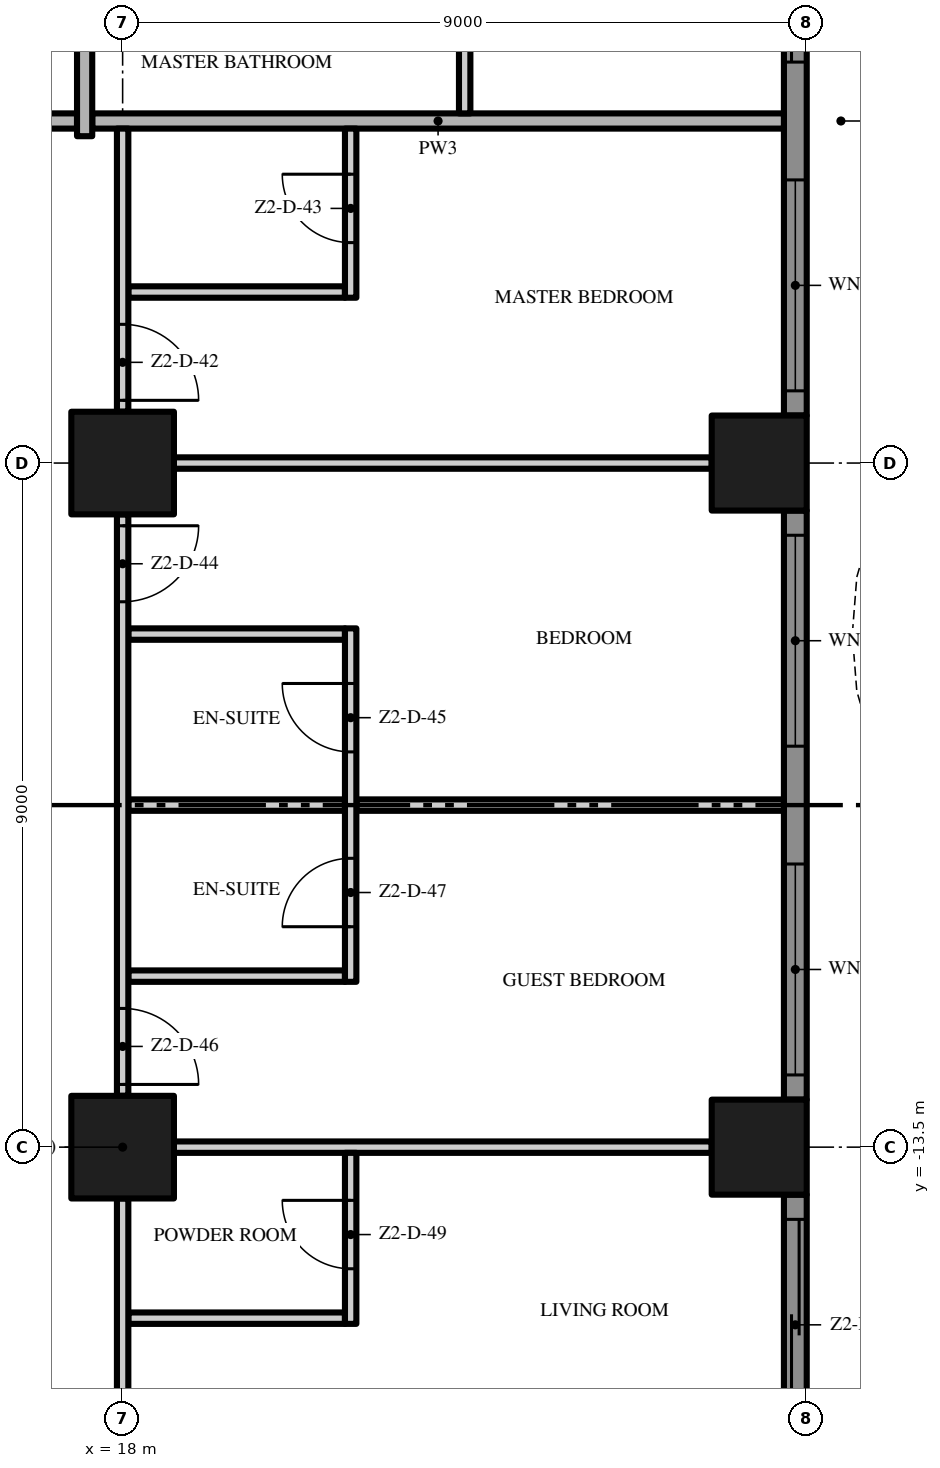
"""IFC4 building model, lengths in metres.
Left out: names, types, materials, properties, quantities, classifications, styles, units other than length and angle.
Written with IfcOpenShell. Run it as: python <this file> out.ifc"""

import sys

from ifc_helpers import new_model, si_unit, direction, frame, frame_2d, origin, origin_2d, place, context, subcontext, project, spatial, polyline, rectangle, outline, extrude, element, fill, save


model = new_model("IFC4")
c1 = context("Model", 3, precision=1e-05, world=origin(), true_north=direction((0.0, 1.0)))
c2 = subcontext(c1, "Body", "Model", "MODEL_VIEW")
j1 = project(units=[si_unit("LENGTHUNIT", "METRE"), si_unit("PLANEANGLEUNIT", "RADIAN")], contexts=[c1])
p1 = place(None, origin())
s1 = spatial("IfcSite", under=j1, at=p1, CompositionType="ELEMENT")
p2 = place(p1, origin())
s2 = spatial("IfcBuilding", under=s1, at=p2, CompositionType="ELEMENT")
p3 = place(p2, frame((0.0, 0.0, 107.4)))
s3 = spatial("IfcBuildingStorey", under=s2, at=p3, CompositionType="ELEMENT", Elevation=107.4)
for number, where, z_axis, x_axis in (
    (1, (18.0, -13.5, 0.0), (0.0, 0.0, 1.0), (1.0, 0.0, 0.0)),
    (2, (18.0, -4.5, 0.0), (0.0, 0.0, 1.0), (1.0, 0.0, 0.0)),
):
    element("IfcColumn", number, at=place(p3, frame(where, z_axis=z_axis, x_axis=x_axis)), inside=s3, PredefinedType="COLUMN", context=c2, shape_type="SweptSolid", body=[
        extrude(rectangle(XDim=1.35, YDim=1.35, at=origin_2d()), origin(), (0.0, 0.0, 1.0), 3.5),
    ])
for number, where, z_axis, x_axis in (
    (3, (26.375, -13.5, 0.0), (0.0, 0.0, 1.0), (1.0, 0.0, 0.0)),
    (4, (26.375, -4.5, 0.0), (0.0, 0.0, 1.0), (1.0, 0.0, 0.0)),
):
    element("IfcColumn", number, at=place(p3, frame(where, z_axis=z_axis, x_axis=x_axis)), inside=s3, PredefinedType="COLUMN", context=c2, shape_type="SweptSolid", body=[
        extrude(rectangle(XDim=1.25, YDim=1.25, at=origin_2d()), origin(), (0.0, 0.0, 1.0), 3.5),
    ])
p4 = place(p3, frame((26.85, -14.125, 0.0), z_axis=(0.0, 0.0, 1.0), x_axis=(0.0, -1.0, 0.0)))
e5 = element("IfcWall", 5, at=p4, inside=s3, PredefinedType="SOLIDWALL", context=c2, shape_type="SweptSolid", body=[
    extrude(rectangle(XDim=3.575, YDim=0.3, at=frame_2d((1.788, 0.0))), origin(), (0.0, 0.0, 1.0), 3.5),
])
p5 = place(p4, frame((0.325, 0.0, 0.0)))
e6 = element("IfcOpeningElement", 6, at=p5, cuts=e5, PredefinedType="OPENING", context=c2, shape_type="SweptSolid", body=[
    extrude(rectangle(XDim=2.775, YDim=2.4, at=frame_2d((1.387, 1.2))), frame((0.0, 0.16, 0.0), z_axis=(0.0, -1.0, 0.0), x_axis=(1.0, 0.0, 0.0)), (0.0, 0.0, 1.0), 0.32),
])
p6 = place(p3, frame((26.85, -5.125, 0.0), z_axis=(0.0, 0.0, 1.0), x_axis=(0.0, -1.0, 0.0)))
e7 = element("IfcWall", 7, at=p6, inside=s3, PredefinedType="SOLIDWALL", context=c2, shape_type="SweptSolid", body=[
    extrude(rectangle(XDim=7.75, YDim=0.3, at=frame_2d((3.875, 0.0))), origin(), (0.0, 0.0, 1.0), 3.5),
])
p7 = place(p6, frame((4.65, 0.0, 0.45)))
e8 = element("IfcOpeningElement", 8, at=p7, cuts=e7, PredefinedType="OPENING", context=c2, shape_type="SweptSolid", body=[
    extrude(rectangle(XDim=2.775, YDim=2.65, at=frame_2d((1.387, 1.325))), frame((0.0, 0.16, 0.0), z_axis=(0.0, -1.0, 0.0), x_axis=(1.0, 0.0, 0.0)), (0.0, 0.0, 1.0), 0.32),
])
p8 = place(p6, frame((0.325, 0.0, 0.45)))
e9 = element("IfcOpeningElement", 9, at=p8, cuts=e7, PredefinedType="OPENING", context=c2, shape_type="SweptSolid", body=[
    extrude(rectangle(XDim=2.775, YDim=2.65, at=frame_2d((1.387, 1.325))), frame((0.0, 0.16, 0.0), z_axis=(0.0, -1.0, 0.0), x_axis=(1.0, 0.0, 0.0)), (0.0, 0.0, 1.0), 0.32),
])
p9 = place(p3, frame((26.85, 3.875, 0.0), z_axis=(0.0, 0.0, 1.0), x_axis=(0.0, -1.0, 0.0)))
e10 = element("IfcWall", 10, at=p9, inside=s3, PredefinedType="SOLIDWALL", context=c2, shape_type="SweptSolid", body=[
    extrude(rectangle(XDim=7.75, YDim=0.3, at=frame_2d((3.875, 0.0))), origin(), (0.0, 0.0, 1.0), 3.5),
])
p10 = place(p9, frame((4.65, 0.0, 0.45)))
e11 = element("IfcOpeningElement", 11, at=p10, cuts=e10, PredefinedType="OPENING", context=c2, shape_type="SweptSolid", body=[
    extrude(rectangle(XDim=2.775, YDim=2.65, at=frame_2d((1.387, 1.325))), frame((0.0, 0.16, 0.0), z_axis=(0.0, -1.0, 0.0), x_axis=(1.0, 0.0, 0.0)), (0.0, 0.0, 1.0), 0.32),
])
p11 = place(p9, frame((0.325, 0.0, 0.0)))
e12 = element("IfcOpeningElement", 12, at=p11, cuts=e10, PredefinedType="OPENING", context=c2, shape_type="SweptSolid", body=[
    extrude(rectangle(XDim=2.775, YDim=2.4, at=frame_2d((1.387, 1.2))), frame((0.0, 0.16, 0.0), z_axis=(0.0, -1.0, 0.0), x_axis=(1.0, 0.0, 0.0)), (0.0, 0.0, 1.0), 0.32),
])
p12 = place(p3, origin())
e13 = element("IfcWall", 13, at=p12, inside=s3, PredefinedType="USERDEFINED", context=c2, shape_type="SweptSolid", body=[
    extrude(outline(polyline([(28.8, -18.0), (29.505, -16.5), (29.941, -15.0), (30.0, -14.25), (29.941, -13.5), (29.505, -12.0), (28.8, -10.5), (28.095, -9.0), (27.659, -7.5), (27.6, -6.75), (27.659, -6.0), (28.095, -4.5), (28.8, -3.0), (29.505, -1.5), (29.941, 0.0), (30.0, 0.75), (29.941, 1.5), (29.505, 3.0), (28.8, 4.5), (28.095, 6.0), (27.659, 7.5), (27.6, 8.25), (27.659, 9.0), (28.095, 10.5), (28.8, 12.0), (29.505, 13.5), (29.941, 15.0), (30.0, 15.75), (29.941, 16.5), (29.505, 18.0), (29.265, 17.93), (29.694, 16.455), (29.749, 15.75), (29.694, 15.045), (29.271, 13.589), (28.574, 12.106), (27.86, 10.589), (27.411, 9.045), (27.349, 8.25), (27.411, 7.455), (27.86, 5.911), (28.574, 4.394), (29.271, 2.911), (29.694, 1.455), (29.749, 0.75), (29.694, 0.045), (29.271, -1.411), (28.574, -2.894), (27.86, -4.411), (27.411, -5.955), (27.349, -6.75), (27.411, -7.545), (27.86, -9.089), (28.574, -10.606), (29.271, -12.089), (29.694, -13.545), (29.749, -14.25), (29.694, -14.955), (29.271, -16.411), (28.574, -17.894), (28.8, -18.0)])), origin(), (0.0, 0.0, 1.0), 0.9),
])
p13 = place(p3, frame((18.075, -15.75, 0.0), z_axis=(0.0, 0.0, 1.0), x_axis=(1.0, 0.0, 0.0)))
e14 = element("IfcWall", 14, at=p13, inside=s3, PredefinedType="PARTITIONING", context=c2, shape_type="SweptSolid", body=[
    extrude(rectangle(XDim=2.85, YDim=0.15, at=frame_2d((1.425, 0.0))), origin(), (0.0, 0.0, 1.0), 3.5),
])
p14 = place(p3, frame((18.675, -13.5, 0.0), z_axis=(0.0, 0.0, 1.0), x_axis=(1.0, 0.0, 0.0)))
e15 = element("IfcWall", 15, at=p14, inside=s3, PredefinedType="PARTITIONING", context=c2, shape_type="SweptSolid", body=[
    extrude(rectangle(XDim=7.075, YDim=0.15, at=frame_2d((3.538, 0.0))), origin(), (0.0, 0.0, 1.0), 3.5),
])
for number, where, z_axis, x_axis in (
    (16, (18.075, -11.25, 0.0), (0.0, 0.0, 1.0), (1.0, 0.0, 0.0)),
    (17, (18.075, -9.0, 0.0), (0.0, 0.0, 1.0), (1.0, 0.0, 0.0)),
):
    element("IfcWall", number, at=place(p3, frame(where, z_axis=z_axis, x_axis=x_axis)), inside=s3, PredefinedType="PARTITIONING", context=c2, shape_type="SweptSolid", body=[
        extrude(rectangle(XDim=2.85, YDim=0.15, at=frame_2d((1.425, 0.0))), origin(), (0.0, 0.0, 1.0), 3.5),
    ])
p15 = place(p3, frame((21.075, -9.0, 0.0), z_axis=(0.0, 0.0, 1.0), x_axis=(1.0, 0.0, 0.0)))
e18 = element("IfcWall", 18, at=p15, inside=s3, PredefinedType="PARTITIONING", context=c2, shape_type="SweptSolid", body=[
    extrude(rectangle(XDim=5.625, YDim=0.15, at=frame_2d((2.812, 0.0))), origin(), (0.0, 0.0, 1.0), 3.5),
])
p16 = place(p3, frame((18.075, -6.75, 0.0), z_axis=(0.0, 0.0, 1.0), x_axis=(1.0, 0.0, 0.0)))
e19 = element("IfcWall", 19, at=p16, inside=s3, PredefinedType="PARTITIONING", context=c2, shape_type="SweptSolid", body=[
    extrude(rectangle(XDim=2.85, YDim=0.15, at=frame_2d((1.425, 0.0))), origin(), (0.0, 0.0, 1.0), 3.5),
])
p17 = place(p3, frame((18.675, -4.5, 0.0), z_axis=(0.0, 0.0, 1.0), x_axis=(1.0, 0.0, 0.0)))
e20 = element("IfcWall", 20, at=p17, inside=s3, PredefinedType="PARTITIONING", context=c2, shape_type="SweptSolid", body=[
    extrude(rectangle(XDim=7.075, YDim=0.15, at=frame_2d((3.538, 0.0))), origin(), (0.0, 0.0, 1.0), 3.5),
])
p18 = place(p3, frame((18.075, -2.25, 0.0), z_axis=(0.0, 0.0, 1.0), x_axis=(1.0, 0.0, 0.0)))
e21 = element("IfcWall", 21, at=p18, inside=s3, PredefinedType="PARTITIONING", context=c2, shape_type="SweptSolid", body=[
    extrude(rectangle(XDim=2.85, YDim=0.15, at=frame_2d((1.425, 0.0))), origin(), (0.0, 0.0, 1.0), 3.5),
])
p19 = place(p3, frame((4.6, 0.0, 0.0), z_axis=(0.0, 0.0, 1.0), x_axis=(1.0, 0.0, 0.0)))
e22 = element("IfcWall", 22, at=p19, inside=s3, PredefinedType="PARTITIONING", context=c2, shape_type="SweptSolid", body=[
    extrude(rectangle(XDim=12.8, YDim=0.2, at=frame_2d((6.4, 0.0))), origin(), (0.0, 0.0, 1.0), 3.5),
])
p20 = place(p3, frame((17.6, 0.0, 0.0), z_axis=(0.0, 0.0, 1.0), x_axis=(1.0, 0.0, 0.0)))
e23 = element("IfcWall", 23, at=p20, inside=s3, PredefinedType="PARTITIONING", context=c2, shape_type="SweptSolid", body=[
    extrude(rectangle(XDim=9.1, YDim=0.2, at=frame_2d((4.55, 0.0))), origin(), (0.0, 0.0, 1.0), 3.5),
])
p21 = place(p3, frame((17.5, -0.2, 0.0), z_axis=(0.0, 0.0, 1.0), x_axis=(0.0, 1.0, 0.0)))
e24 = element("IfcWall", 24, at=p21, inside=s3, PredefinedType="PARTITIONING", context=c2, shape_type="SweptSolid", body=[
    extrude(rectangle(XDim=4.025, YDim=0.2, at=frame_2d((2.013, 0.0))), origin(), (0.0, 0.0, 1.0), 3.5),
])
p22 = place(p3, frame((18.0, -14.175, 0.0), z_axis=(0.0, 0.0, 1.0), x_axis=(0.0, -1.0, 0.0)))
e25 = element("IfcWall", 25, at=p22, inside=s3, PredefinedType="PARTITIONING", context=c2, shape_type="SweptSolid", body=[
    extrude(rectangle(XDim=7.075, YDim=0.15, at=frame_2d((3.538, 0.0))), origin(), (0.0, 0.0, 1.0), 3.5),
])
p23 = place(p22, frame((4.075, 0.0, 0.0)))
e26 = element("IfcOpeningElement", 26, at=p23, cuts=e25, PredefinedType="OPENING", context=c2, shape_type="SweptSolid", body=[
    extrude(rectangle(XDim=1.8, YDim=2.4, at=frame_2d((0.9, 1.2))), frame((0.0, 0.085, 0.0), z_axis=(0.0, -1.0, 0.0), x_axis=(1.0, 0.0, 0.0)), (0.0, 0.0, 1.0), 0.17),
])
p24 = place(p3, frame((18.0, -5.175, 0.0), z_axis=(0.0, 0.0, 1.0), x_axis=(0.0, -1.0, 0.0)))
e27 = element("IfcWall", 27, at=p24, inside=s3, PredefinedType="PARTITIONING", context=c2, shape_type="SweptSolid", body=[
    extrude(rectangle(XDim=7.65, YDim=0.15, at=frame_2d((3.825, 0.0))), origin(), (0.0, 0.0, 1.0), 3.5),
])
p25 = place(p24, frame((0.15, 0.0, 0.0)))
e28 = element("IfcOpeningElement", 28, at=p25, cuts=e27, PredefinedType="OPENING", context=c2, shape_type="SweptSolid", body=[
    extrude(rectangle(XDim=1.0, YDim=2.4, at=frame_2d((0.5, 1.2))), frame((0.0, 0.085, 0.0), z_axis=(0.0, -1.0, 0.0), x_axis=(1.0, 0.0, 0.0)), (0.0, 0.0, 1.0), 0.17),
])
p26 = place(p24, frame((6.5, 0.0, 0.0)))
e29 = element("IfcOpeningElement", 29, at=p26, cuts=e27, PredefinedType="OPENING", context=c2, shape_type="SweptSolid", body=[
    extrude(rectangle(XDim=1.0, YDim=2.4, at=frame_2d((0.5, 1.2))), frame((0.0, 0.085, 0.0), z_axis=(0.0, -1.0, 0.0), x_axis=(1.0, 0.0, 0.0)), (0.0, 0.0, 1.0), 0.17),
])
p27 = place(p3, frame((18.0, -0.1, 0.0), z_axis=(0.0, 0.0, 1.0), x_axis=(0.0, -1.0, 0.0)))
e30 = element("IfcWall", 30, at=p27, inside=s3, PredefinedType="PARTITIONING", context=c2, shape_type="SweptSolid", body=[
    extrude(rectangle(XDim=3.725, YDim=0.15, at=frame_2d((1.863, 0.0))), origin(), (0.0, 0.0, 1.0), 3.5),
])
p28 = place(p27, frame((2.575, 0.0, 0.0)))
e31 = element("IfcOpeningElement", 31, at=p28, cuts=e30, PredefinedType="OPENING", context=c2, shape_type="SweptSolid", body=[
    extrude(rectangle(XDim=1.0, YDim=2.4, at=frame_2d((0.5, 1.2))), frame((0.0, 0.085, 0.0), z_axis=(0.0, -1.0, 0.0), x_axis=(1.0, 0.0, 0.0)), (0.0, 0.0, 1.0), 0.17),
])
p29 = place(p3, frame((21.0, -15.825, 0.0), z_axis=(0.0, 0.0, 1.0), x_axis=(0.0, 1.0, 0.0)))
e32 = element("IfcWall", 32, at=p29, inside=s3, PredefinedType="PARTITIONING", context=c2, shape_type="SweptSolid", body=[
    extrude(rectangle(XDim=2.25, YDim=0.15, at=frame_2d((1.125, 0.0))), origin(), (0.0, 0.0, 1.0), 3.5),
])
p30 = place(p29, frame((0.725, 0.0, 0.0)))
e33 = element("IfcOpeningElement", 33, at=p30, cuts=e32, PredefinedType="OPENING", context=c2, shape_type="SweptSolid", body=[
    extrude(rectangle(XDim=0.9, YDim=2.1, at=frame_2d((0.45, 1.05))), frame((0.0, 0.085, 0.0), z_axis=(0.0, -1.0, 0.0), x_axis=(1.0, 0.0, 0.0)), (0.0, 0.0, 1.0), 0.17),
])
p31 = place(p3, frame((21.0, -11.325, 0.0), z_axis=(0.0, 0.0, 1.0), x_axis=(0.0, 1.0, 0.0)))
e34 = element("IfcWall", 34, at=p31, inside=s3, PredefinedType="PARTITIONING", context=c2, shape_type="SweptSolid", body=[
    extrude(rectangle(XDim=4.65, YDim=0.15, at=frame_2d((2.325, 0.0))), origin(), (0.0, 0.0, 1.0), 3.5),
])
p32 = place(p31, frame((3.025, 0.0, 0.0)))
e35 = element("IfcOpeningElement", 35, at=p32, cuts=e34, PredefinedType="OPENING", context=c2, shape_type="SweptSolid", body=[
    extrude(rectangle(XDim=0.9, YDim=2.1, at=frame_2d((0.45, 1.05))), frame((0.0, 0.085, 0.0), z_axis=(0.0, -1.0, 0.0), x_axis=(1.0, 0.0, 0.0)), (0.0, 0.0, 1.0), 0.17),
])
p33 = place(p31, frame((0.725, 0.0, 0.0)))
e36 = element("IfcOpeningElement", 36, at=p33, cuts=e34, PredefinedType="OPENING", context=c2, shape_type="SweptSolid", body=[
    extrude(rectangle(XDim=0.9, YDim=2.1, at=frame_2d((0.45, 1.05))), frame((0.0, 0.085, 0.0), z_axis=(0.0, -1.0, 0.0), x_axis=(1.0, 0.0, 0.0)), (0.0, 0.0, 1.0), 0.17),
])
p34 = place(p3, frame((21.0, -2.325, 0.0), z_axis=(0.0, 0.0, 1.0), x_axis=(0.0, 1.0, 0.0)))
e37 = element("IfcWall", 37, at=p34, inside=s3, PredefinedType="PARTITIONING", context=c2, shape_type="SweptSolid", body=[
    extrude(rectangle(XDim=2.225, YDim=0.15, at=frame_2d((1.113, 0.0))), origin(), (0.0, 0.0, 1.0), 3.5),
])
p35 = place(p34, frame((0.725, 0.0, 0.0)))
e38 = element("IfcOpeningElement", 38, at=p35, cuts=e37, PredefinedType="OPENING", context=c2, shape_type="SweptSolid", body=[
    extrude(rectangle(XDim=0.9, YDim=2.1, at=frame_2d((0.45, 1.05))), frame((0.0, 0.085, 0.0), z_axis=(0.0, -1.0, 0.0), x_axis=(1.0, 0.0, 0.0)), (0.0, 0.0, 1.0), 0.17),
])
p36 = place(p3, frame((22.5, 17.375, 0.0), z_axis=(0.0, 0.0, 1.0), x_axis=(0.0, -1.0, 0.0)))
e39 = element("IfcWall", 39, at=p36, inside=s3, PredefinedType="PARTITIONING", context=c2, shape_type="SweptSolid", body=[
    extrude(rectangle(XDim=17.275, YDim=0.15, at=frame_2d((8.637, 0.0))), origin(), (0.0, 0.0, 1.0), 3.5),
])
p37 = place(p36, frame((14.625, 0.0, 0.0)))
e40 = element("IfcOpeningElement", 40, at=p37, cuts=e39, PredefinedType="OPENING", context=c2, shape_type="SweptSolid", body=[
    extrude(rectangle(XDim=1.0, YDim=2.4, at=frame_2d((0.5, 1.2))), frame((0.0, 0.085, 0.0), z_axis=(0.0, -1.0, 0.0), x_axis=(1.0, 0.0, 0.0)), (0.0, 0.0, 1.0), 0.17),
])
p38 = place(p36, frame((9.025, 0.0, 0.0)))
e41 = element("IfcOpeningElement", 41, at=p38, cuts=e39, PredefinedType="OPENING", context=c2, shape_type="SweptSolid", body=[
    extrude(rectangle(XDim=1.0, YDim=2.4, at=frame_2d((0.5, 1.2))), frame((0.0, 0.085, 0.0), z_axis=(0.0, -1.0, 0.0), x_axis=(1.0, 0.0, 0.0)), (0.0, 0.0, 1.0), 0.17),
])
p39 = place(p36, frame((6.775, 0.0, 0.0)))
e42 = element("IfcOpeningElement", 42, at=p39, cuts=e39, PredefinedType="OPENING", context=c2, shape_type="SweptSolid", body=[
    extrude(rectangle(XDim=1.0, YDim=2.4, at=frame_2d((0.5, 1.2))), frame((0.0, 0.085, 0.0), z_axis=(0.0, -1.0, 0.0), x_axis=(1.0, 0.0, 0.0)), (0.0, 0.0, 1.0), 0.17),
])
p40 = place(p36, frame((0.15, 0.0, 0.0)))
e43 = element("IfcOpeningElement", 43, at=p40, cuts=e39, PredefinedType="OPENING", context=c2, shape_type="SweptSolid", body=[
    extrude(rectangle(XDim=1.0, YDim=2.4, at=frame_2d((0.5, 1.2))), frame((0.0, 0.085, 0.0), z_axis=(0.0, -1.0, 0.0), x_axis=(1.0, 0.0, 0.0)), (0.0, 0.0, 1.0), 0.17),
])
p41 = place(p5, origin())
e44 = element("IfcDoor", 44, at=p41, inside=s3, OperationType="SINGLE_SWING_LEFT", PredefinedType="DOOR", context=c2, shape_type="SweptSolid", body=[
    extrude(rectangle(XDim=2.775, YDim=2.4, at=frame_2d((1.387, 1.2))), frame((0.0, 0.025, 0.0), z_axis=(0.0, -1.0, 0.0), x_axis=(1.0, 0.0, 0.0)), (0.0, 0.0, 1.0), 0.05),
])
fill(e6, e44)
p42 = place(p7, origin())
e45 = element("IfcWindow", 45, at=p42, inside=s3, PartitioningType="SINGLE_PANEL", PredefinedType="WINDOW", context=c2, shape_type="SweptSolid", body=[
    extrude(rectangle(XDim=2.775, YDim=2.65, at=frame_2d((1.387, 1.325))), frame((0.0, 0.03, 0.0), z_axis=(0.0, -1.0, 0.0), x_axis=(1.0, 0.0, 0.0)), (0.0, 0.0, 1.0), 0.06),
])
fill(e8, e45)
p43 = place(p8, origin())
e46 = element("IfcWindow", 46, at=p43, inside=s3, PartitioningType="SINGLE_PANEL", PredefinedType="WINDOW", context=c2, shape_type="SweptSolid", body=[
    extrude(rectangle(XDim=2.775, YDim=2.65, at=frame_2d((1.387, 1.325))), frame((0.0, 0.03, 0.0), z_axis=(0.0, -1.0, 0.0), x_axis=(1.0, 0.0, 0.0)), (0.0, 0.0, 1.0), 0.06),
])
fill(e9, e46)
p44 = place(p10, origin())
e47 = element("IfcWindow", 47, at=p44, inside=s3, PartitioningType="SINGLE_PANEL", PredefinedType="WINDOW", context=c2, shape_type="SweptSolid", body=[
    extrude(rectangle(XDim=2.775, YDim=2.65, at=frame_2d((1.387, 1.325))), frame((0.0, 0.03, 0.0), z_axis=(0.0, -1.0, 0.0), x_axis=(1.0, 0.0, 0.0)), (0.0, 0.0, 1.0), 0.06),
])
fill(e11, e47)
p45 = place(p11, origin())
e48 = element("IfcDoor", 48, at=p45, inside=s3, OperationType="SINGLE_SWING_LEFT", PredefinedType="DOOR", context=c2, shape_type="SweptSolid", body=[
    extrude(rectangle(XDim=2.775, YDim=2.4, at=frame_2d((1.387, 1.2))), frame((0.0, 0.025, 0.0), z_axis=(0.0, -1.0, 0.0), x_axis=(1.0, 0.0, 0.0)), (0.0, 0.0, 1.0), 0.05),
])
fill(e12, e48)
p46 = place(p28, origin())
e49 = element("IfcDoor", 49, at=p46, inside=s3, OperationType="SINGLE_SWING_RIGHT", PredefinedType="DOOR", context=c2, shape_type="SweptSolid", body=[
    extrude(rectangle(XDim=1.0, YDim=2.4, at=frame_2d((0.5, 1.2))), frame((0.0, 0.025, 0.0), z_axis=(0.0, -1.0, 0.0), x_axis=(1.0, 0.0, 0.0)), (0.0, 0.0, 1.0), 0.05),
])
fill(e31, e49)
p47 = place(p35, origin())
e50 = element("IfcDoor", 50, at=p47, inside=s3, OperationType="SINGLE_SWING_RIGHT", PredefinedType="DOOR", context=c2, shape_type="SweptSolid", body=[
    extrude(rectangle(XDim=0.9, YDim=2.1, at=frame_2d((0.45, 1.05))), frame((0.0, 0.025, 0.0), z_axis=(0.0, -1.0, 0.0), x_axis=(1.0, 0.0, 0.0)), (0.0, 0.0, 1.0), 0.05),
])
fill(e38, e50)
p48 = place(p25, origin())
e51 = element("IfcDoor", 51, at=p48, inside=s3, OperationType="SINGLE_SWING_LEFT", PredefinedType="DOOR", context=c2, shape_type="SweptSolid", body=[
    extrude(rectangle(XDim=1.0, YDim=2.4, at=frame_2d((0.5, 1.2))), frame((0.0, 0.025, 0.0), z_axis=(0.0, -1.0, 0.0), x_axis=(1.0, 0.0, 0.0)), (0.0, 0.0, 1.0), 0.05),
])
fill(e28, e51)
p49 = place(p32, origin())
e52 = element("IfcDoor", 52, at=p49, inside=s3, OperationType="SINGLE_SWING_RIGHT", PredefinedType="DOOR", context=c2, shape_type="SweptSolid", body=[
    extrude(rectangle(XDim=0.9, YDim=2.1, at=frame_2d((0.45, 1.05))), frame((0.0, 0.025, 0.0), z_axis=(0.0, -1.0, 0.0), x_axis=(1.0, 0.0, 0.0)), (0.0, 0.0, 1.0), 0.05),
])
fill(e35, e52)
p50 = place(p26, origin())
e53 = element("IfcDoor", 53, at=p50, inside=s3, OperationType="SINGLE_SWING_RIGHT", PredefinedType="DOOR", context=c2, shape_type="SweptSolid", body=[
    extrude(rectangle(XDim=1.0, YDim=2.4, at=frame_2d((0.5, 1.2))), frame((0.0, 0.025, 0.0), z_axis=(0.0, -1.0, 0.0), x_axis=(1.0, 0.0, 0.0)), (0.0, 0.0, 1.0), 0.05),
])
fill(e29, e53)
p51 = place(p33, origin())
e54 = element("IfcDoor", 54, at=p51, inside=s3, OperationType="SINGLE_SWING_LEFT", PredefinedType="DOOR", context=c2, shape_type="SweptSolid", body=[
    extrude(rectangle(XDim=0.9, YDim=2.1, at=frame_2d((0.45, 1.05))), frame((0.0, 0.025, 0.0), z_axis=(0.0, -1.0, 0.0), x_axis=(1.0, 0.0, 0.0)), (0.0, 0.0, 1.0), 0.05),
])
fill(e36, e54)
p52 = place(p30, origin())
e55 = element("IfcDoor", 55, at=p52, inside=s3, OperationType="SINGLE_SWING_RIGHT", PredefinedType="DOOR", context=c2, shape_type="SweptSolid", body=[
    extrude(rectangle(XDim=0.9, YDim=2.1, at=frame_2d((0.45, 1.05))), frame((0.0, 0.025, 0.0), z_axis=(0.0, -1.0, 0.0), x_axis=(1.0, 0.0, 0.0)), (0.0, 0.0, 1.0), 0.05),
])
fill(e33, e55)
save(model, sys.argv[1])
